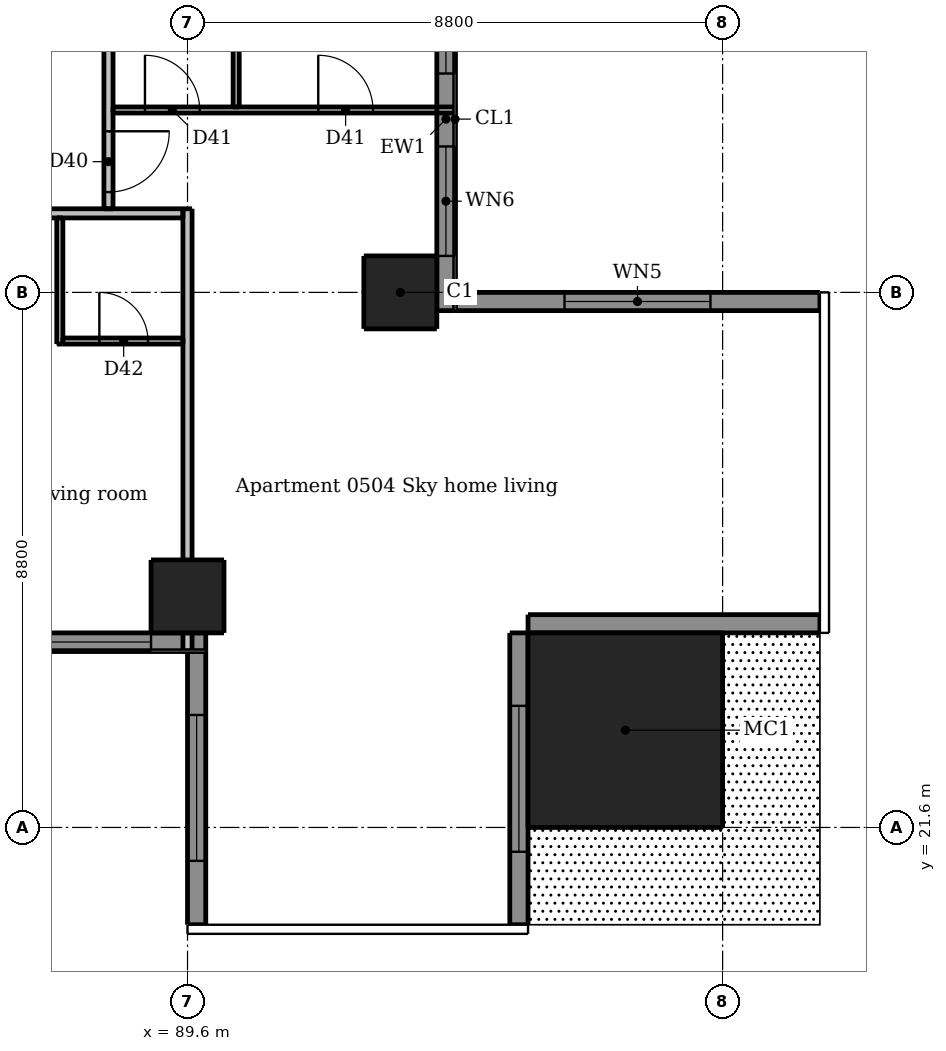
"""IFC4 building model, lengths in metres.
Left out: names, types, materials, properties, quantities, classifications, styles, units other than length and angle.
Written with IfcOpenShell. Run it as: python <this file> out.ifc"""

import sys

from ifc_helpers import new_model, si_unit, direction, frame, frame_2d, origin, origin_2d, place, context, subcontext, project, spatial, rectangle, extrude, element, fill, save


model = new_model("IFC4")
c1 = context("Model", 3, precision=1e-05, world=origin(), true_north=direction((0.0, 1.0)))
c2 = subcontext(c1, "Body", "Model", "MODEL_VIEW")
j1 = project(units=[si_unit("LENGTHUNIT", "METRE"), si_unit("PLANEANGLEUNIT", "RADIAN")], contexts=[c1])
p1 = place(None, origin())
s1 = spatial("IfcSite", under=j1, at=p1, CompositionType="ELEMENT")
p2 = place(p1, origin())
s2 = spatial("IfcBuilding", under=s1, at=p2, CompositionType="ELEMENT")
p3 = place(p2, frame((0.0, 0.0, 23.5)))
s3 = spatial("IfcBuildingStorey", under=s2, at=p3, CompositionType="ELEMENT", Elevation=23.5)
for number, where, z_axis, x_axis in (
    (1, (89.6, 25.4, 0.0), (0.0, 0.0, 1.0), (1.0, 0.0, 0.0)),
    (2, (93.1, 30.4, 0.0), (0.0, 0.0, 1.0), (1.0, 0.0, 0.0)),
):
    element("IfcColumn", number, at=place(p3, frame(where, z_axis=z_axis, x_axis=x_axis)), inside=s3, PredefinedType="COLUMN", context=c2, shape_type="SweptSolid", body=[
        extrude(rectangle(XDim=1.2, YDim=1.2, at=origin_2d()), origin(), (0.0, 0.0, 1.0), 3.05),
    ])
p4 = place(p3, frame((96.8, 23.2, 0.0), z_axis=(0.0, 0.0, 1.0), x_axis=(1.0, 0.0, 0.0)))
e3 = element("IfcColumn", 3, at=p4, inside=s3, PredefinedType="COLUMN", context=c2, shape_type="SweptSolid", body=[
    extrude(rectangle(XDim=3.2, YDim=3.2, at=origin_2d()), origin(), (0.0, 0.0, 1.0), 3.3),
])
p5 = place(p3, frame((89.75, 24.5, 0.0), z_axis=(0.0, 0.0, 1.0), x_axis=(0.0, -1.0, 0.0)))
e4 = element("IfcWall", 4, at=p5, inside=s3, PredefinedType="SOLIDWALL", context=c2, shape_type="SweptSolid", body=[
    extrude(rectangle(XDim=4.5, YDim=0.3, at=frame_2d((2.25, 0.0))), origin(), (0.0, 0.0, 1.0), 3.05),
])
p6 = place(p5, frame((1.05, 0.0, 0.15)))
e5 = element("IfcOpeningElement", 5, at=p6, cuts=e4, PredefinedType="OPENING", context=c2, shape_type="SweptSolid", body=[
    extrude(rectangle(XDim=2.4, YDim=2.1, at=frame_2d((1.2, 1.05))), frame((0.0, 0.16, 0.0), z_axis=(0.0, -1.0, 0.0), x_axis=(1.0, 0.0, 0.0)), (0.0, 0.0, 1.0), 0.32),
])
p7 = place(p3, frame((95.05, 20.0, 0.0), z_axis=(0.0, 0.0, 1.0), x_axis=(0.0, 1.0, 0.0)))
e6 = element("IfcWall", 6, at=p7, inside=s3, PredefinedType="SOLIDWALL", context=c2, shape_type="SweptSolid", body=[
    extrude(rectangle(XDim=4.8, YDim=0.3, at=frame_2d((2.4, 0.0))), origin(), (0.0, 0.0, 1.0), 3.05),
])
p8 = place(p7, frame((1.2, 0.0, 0.15)))
e7 = element("IfcOpeningElement", 7, at=p8, cuts=e6, PredefinedType="OPENING", context=c2, shape_type="SweptSolid", body=[
    extrude(rectangle(XDim=2.4, YDim=2.1, at=frame_2d((1.2, 1.05))), frame((0.0, 0.16, 0.0), z_axis=(0.0, -1.0, 0.0), x_axis=(1.0, 0.0, 0.0)), (0.0, 0.0, 1.0), 0.32),
])
p9 = place(p3, frame((95.2, 24.95, 0.0), z_axis=(0.0, 0.0, 1.0), x_axis=(1.0, 0.0, 0.0)))
e8 = element("IfcWall", 8, at=p9, inside=s3, PredefinedType="SOLIDWALL", context=c2, shape_type="SweptSolid", body=[
    extrude(rectangle(XDim=4.8, YDim=0.3, at=frame_2d((2.4, 0.0))), origin(), (0.0, 0.0, 1.0), 3.05),
])
p10 = place(p3, frame((100.0, 30.25, 0.0), z_axis=(0.0, 0.0, 1.0), x_axis=(-1.0, 0.0, 0.0)))
e9 = element("IfcWall", 9, at=p10, inside=s3, PredefinedType="SOLIDWALL", context=c2, shape_type="SweptSolid", body=[
    extrude(rectangle(XDim=6.0, YDim=0.3, at=frame_2d((3.0, 0.0))), origin(), (0.0, 0.0, 1.0), 3.05),
])
p11 = place(p10, frame((1.8, 0.0, 0.15)))
e10 = element("IfcOpeningElement", 10, at=p11, cuts=e9, PredefinedType="OPENING", context=c2, shape_type="SweptSolid", body=[
    extrude(rectangle(XDim=2.4, YDim=2.1, at=frame_2d((1.2, 1.05))), frame((0.0, 0.16, 0.0), z_axis=(0.0, -1.0, 0.0), x_axis=(1.0, 0.0, 0.0)), (0.0, 0.0, 1.0), 0.32),
])
p12 = place(p3, frame((83.9, 24.65, 0.0), z_axis=(0.0, 0.0, 1.0), x_axis=(1.0, 0.0, 0.0)))
e11 = element("IfcWall", 11, at=p12, inside=s3, PredefinedType="SOLIDWALL", context=c2, shape_type="SweptSolid", body=[
    extrude(rectangle(XDim=6.0, YDim=0.3, at=frame_2d((3.0, 0.0))), origin(), (0.0, 0.0, 1.0), 3.05),
])
p13 = place(p12, frame((0.3, 0.0, 0.15)))
e12 = element("IfcOpeningElement", 12, at=p13, cuts=e11, PredefinedType="OPENING", context=c2, shape_type="SweptSolid", body=[
    extrude(rectangle(XDim=1.8, YDim=2.1, at=frame_2d((0.9, 1.05))), frame((0.0, 0.16, 0.0), z_axis=(0.0, -1.0, 0.0), x_axis=(1.0, 0.0, 0.0)), (0.0, 0.0, 1.0), 0.32),
])
p14 = place(p12, frame((3.3, 0.0, 0.15)))
e13 = element("IfcOpeningElement", 13, at=p14, cuts=e11, PredefinedType="OPENING", context=c2, shape_type="SweptSolid", body=[
    extrude(rectangle(XDim=1.8, YDim=2.1, at=frame_2d((0.9, 1.05))), frame((0.0, 0.16, 0.0), z_axis=(0.0, -1.0, 0.0), x_axis=(1.0, 0.0, 0.0)), (0.0, 0.0, 1.0), 0.32),
])
p15 = place(p3, frame((93.85, 30.1, 0.0), z_axis=(0.0, 0.0, 1.0), x_axis=(0.0, 1.0, 0.0)))
e14 = element("IfcWall", 14, at=p15, inside=s3, PredefinedType="SOLIDWALL", context=c2, shape_type="SweptSolid", body=[
    extrude(rectangle(XDim=6.3, YDim=0.3, at=frame_2d((3.15, 0.0))), origin(), (0.0, 0.0, 1.0), 3.05),
])
p16 = place(p15, frame((0.9, 0.0, 0.15)))
e15 = element("IfcOpeningElement", 15, at=p16, cuts=e14, PredefinedType="OPENING", context=c2, shape_type="SweptSolid", body=[
    extrude(rectangle(XDim=1.8, YDim=2.1, at=frame_2d((0.9, 1.05))), frame((0.0, 0.16, 0.0), z_axis=(0.0, -1.0, 0.0), x_axis=(1.0, 0.0, 0.0)), (0.0, 0.0, 1.0), 0.32),
])
p17 = place(p15, frame((3.9, 0.0, 0.15)))
e16 = element("IfcOpeningElement", 16, at=p17, cuts=e14, PredefinedType="OPENING", context=c2, shape_type="SweptSolid", body=[
    extrude(rectangle(XDim=1.8, YDim=2.1, at=frame_2d((0.9, 1.05))), frame((0.0, 0.16, 0.0), z_axis=(0.0, -1.0, 0.0), x_axis=(1.0, 0.0, 0.0)), (0.0, 0.0, 1.0), 0.32),
])
p18 = place(p3, frame((87.5, 29.55, 0.0), z_axis=(0.0, 0.0, 1.0), x_axis=(0.0, 1.0, 0.0)))
e17 = element("IfcWall", 17, at=p18, inside=s3, PredefinedType="PARTITIONING", context=c2, shape_type="SweptSolid", body=[
    extrude(rectangle(XDim=2.075, YDim=0.1, at=frame_2d((1.038, 0.0))), origin(), (0.0, 0.0, 1.0), 3.05),
])
p19 = place(p3, frame((90.4, 33.45, 0.0), z_axis=(0.0, 0.0, 1.0), x_axis=(0.0, 1.0, 0.0)))
e18 = element("IfcWall", 18, at=p19, inside=s3, PredefinedType="PARTITIONING", context=c2, shape_type="SweptSolid", body=[
    extrude(rectangle(XDim=8.5, YDim=0.1, at=frame_2d((4.25, 0.0))), origin(), (0.0, 0.0, 1.0), 3.05),
])
p20 = place(p19, frame((3.8, 0.0, 0.0)))
e19 = element("IfcOpeningElement", 19, at=p20, cuts=e18, PredefinedType="OPENING", context=c2, shape_type="SweptSolid", body=[
    extrude(rectangle(XDim=0.8, YDim=2.1, at=frame_2d((0.4, 1.05))), frame((0.0, 0.06, 0.0), z_axis=(0.0, -1.0, 0.0), x_axis=(1.0, 0.0, 0.0)), (0.0, 0.0, 1.0), 0.12),
])
p21 = place(p19, frame((6.8, 0.0, 0.0)))
e20 = element("IfcOpeningElement", 20, at=p21, cuts=e18, PredefinedType="OPENING", context=c2, shape_type="SweptSolid", body=[
    extrude(rectangle(XDim=0.9, YDim=2.1, at=frame_2d((0.45, 1.05))), frame((0.0, 0.06, 0.0), z_axis=(0.0, -1.0, 0.0), x_axis=(1.0, 0.0, 0.0)), (0.0, 0.0, 1.0), 0.12),
])
p22 = place(p3, frame((88.375, 33.4, 0.0), z_axis=(0.0, 0.0, 1.0), x_axis=(1.0, 0.0, 0.0)))
e21 = element("IfcWall", 21, at=p22, inside=s3, PredefinedType="PARTITIONING", context=c2, shape_type="SweptSolid", body=[
    extrude(rectangle(XDim=5.625, YDim=0.1, at=frame_2d((2.812, 0.0))), origin(), (0.0, 0.0, 1.0), 3.05),
])
p23 = place(p22, frame((0.525, 0.0, 0.0)))
e22 = element("IfcOpeningElement", 22, at=p23, cuts=e21, PredefinedType="OPENING", context=c2, shape_type="SweptSolid", body=[
    extrude(rectangle(XDim=0.9, YDim=2.1, at=frame_2d((0.45, 1.05))), frame((0.0, 0.06, 0.0), z_axis=(0.0, -1.0, 0.0), x_axis=(1.0, 0.0, 0.0)), (0.0, 0.0, 1.0), 0.12),
])
p24 = place(p22, frame((3.375, 0.0, 0.0)))
e23 = element("IfcOpeningElement", 23, at=p24, cuts=e21, PredefinedType="OPENING", context=c2, shape_type="SweptSolid", body=[
    extrude(rectangle(XDim=0.9, YDim=2.1, at=frame_2d((0.45, 1.05))), frame((0.0, 0.06, 0.0), z_axis=(0.0, -1.0, 0.0), x_axis=(1.0, 0.0, 0.0)), (0.0, 0.0, 1.0), 0.12),
])
p25 = place(p3, frame((87.55, 29.6, 0.0), z_axis=(0.0, 0.0, 1.0), x_axis=(1.0, 0.0, 0.0)))
e24 = element("IfcWall", 24, at=p25, inside=s3, PredefinedType="PARTITIONING", context=c2, shape_type="SweptSolid", body=[
    extrude(rectangle(XDim=1.975, YDim=0.1, at=frame_2d((0.987, 0.0))), origin(), (0.0, 0.0, 1.0), 3.05),
])
p26 = place(p25, frame((0.6, 0.0, 0.0)))
e25 = element("IfcOpeningElement", 25, at=p26, cuts=e24, PredefinedType="OPENING", context=c2, shape_type="SweptSolid", body=[
    extrude(rectangle(XDim=0.8, YDim=2.1, at=frame_2d((0.4, 1.05))), frame((0.0, 0.06, 0.0), z_axis=(0.0, -1.0, 0.0), x_axis=(1.0, 0.0, 0.0)), (0.0, 0.0, 1.0), 0.12),
])
p27 = place(p3, frame((88.3, 60.475, 0.0), z_axis=(0.0, 0.0, 1.0), x_axis=(0.0, -1.0, 0.0)))
e26 = element("IfcWall", 26, at=p27, inside=s3, PredefinedType="PARTITIONING", context=c2, shape_type="SweptSolid", body=[
    extrude(rectangle(XDim=28.7, YDim=0.15, at=frame_2d((14.35, 0.0))), origin(), (0.0, 0.0, 1.0), 3.05),
])
p28 = place(p27, frame((27.425, 0.0, 0.0)))
e27 = element("IfcOpeningElement", 27, at=p28, cuts=e26, PredefinedType="OPENING", context=c2, shape_type="SweptSolid", body=[
    extrude(rectangle(XDim=1.0, YDim=2.1, at=frame_2d((0.5, 1.05))), frame((0.0, 0.085, 0.0), z_axis=(0.0, -1.0, 0.0), x_axis=(1.0, 0.0, 0.0)), (0.0, 0.0, 1.0), 0.17),
])
p29 = place(p27, frame((16.325, 0.0, 0.0)))
e28 = element("IfcOpeningElement", 28, at=p29, cuts=e26, PredefinedType="OPENING", context=c2, shape_type="SweptSolid", body=[
    extrude(rectangle(XDim=1.0, YDim=2.1, at=frame_2d((0.5, 1.05))), frame((0.0, 0.085, 0.0), z_axis=(0.0, -1.0, 0.0), x_axis=(1.0, 0.0, 0.0)), (0.0, 0.0, 1.0), 0.17),
])
p30 = place(p27, frame((5.525, 0.0, 0.0)))
e29 = element("IfcOpeningElement", 29, at=p30, cuts=e26, PredefinedType="OPENING", context=c2, shape_type="SweptSolid", body=[
    extrude(rectangle(XDim=1.0, YDim=2.1, at=frame_2d((0.5, 1.05))), frame((0.0, 0.085, 0.0), z_axis=(0.0, -1.0, 0.0), x_axis=(1.0, 0.0, 0.0)), (0.0, 0.0, 1.0), 0.17),
])
p31 = place(p3, frame((89.6, 24.5, 0.0), z_axis=(0.0, 0.0, 1.0), x_axis=(0.0, 1.0, 0.0)))
e30 = element("IfcWall", 30, at=p31, inside=s3, PredefinedType="PARTITIONING", context=c2, shape_type="SweptSolid", body=[
    extrude(rectangle(XDim=7.275, YDim=0.15, at=frame_2d((3.637, 0.0))), origin(), (0.0, 0.0, 1.0), 2.516),
])
p32 = place(p3, frame((89.525, 31.7, 0.0), z_axis=(0.0, 0.0, 1.0), x_axis=(-1.0, 0.0, 0.0)))
e31 = element("IfcWall", 31, at=p32, inside=s3, PredefinedType="PARTITIONING", context=c2, shape_type="SweptSolid", body=[
    extrude(rectangle(XDim=28.75, YDim=0.15, at=frame_2d((14.375, 0.0))), origin(), (0.0, 0.0, 1.0), 3.05),
])
p33 = place(p32, frame((24.625, 0.0, 0.0)))
e32 = element("IfcOpeningElement", 32, at=p33, cuts=e31, PredefinedType="OPENING", context=c2, shape_type="SweptSolid", body=[
    extrude(rectangle(XDim=1.0, YDim=2.1, at=frame_2d((0.5, 1.05))), frame((0.0, 0.085, 0.0), z_axis=(0.0, -1.0, 0.0), x_axis=(1.0, 0.0, 0.0)), (0.0, 0.0, 1.0), 0.17),
])
p34 = place(p32, frame((10.225, 0.0, 0.0)))
e33 = element("IfcOpeningElement", 33, at=p34, cuts=e31, PredefinedType="OPENING", context=c2, shape_type="SweptSolid", body=[
    extrude(rectangle(XDim=1.0, YDim=2.1, at=frame_2d((0.5, 1.05))), frame((0.0, 0.085, 0.0), z_axis=(0.0, -1.0, 0.0), x_axis=(1.0, 0.0, 0.0)), (0.0, 0.0, 1.0), 0.17),
])
p35 = place(p32, frame((2.425, 0.0, 0.0)))
e34 = element("IfcOpeningElement", 34, at=p35, cuts=e31, PredefinedType="OPENING", context=c2, shape_type="SweptSolid", body=[
    extrude(rectangle(XDim=1.0, YDim=2.1, at=frame_2d((0.5, 1.05))), frame((0.0, 0.085, 0.0), z_axis=(0.0, -1.0, 0.0), x_axis=(1.0, 0.0, 0.0)), (0.0, 0.0, 1.0), 0.17),
])
p36 = place(p6, origin())
e35 = element("IfcWindow", 35, at=p36, inside=s3, PartitioningType="DOUBLE_PANEL_VERTICAL", PredefinedType="WINDOW", context=c2, shape_type="SweptSolid", body=[
    extrude(rectangle(XDim=2.4, YDim=2.1, at=frame_2d((1.2, 1.05))), frame((0.0, 0.03, 0.0), z_axis=(0.0, -1.0, 0.0), x_axis=(1.0, 0.0, 0.0)), (0.0, 0.0, 1.0), 0.06),
])
fill(e5, e35)
p37 = place(p8, origin())
e36 = element("IfcWindow", 36, at=p37, inside=s3, PartitioningType="DOUBLE_PANEL_VERTICAL", PredefinedType="WINDOW", context=c2, shape_type="SweptSolid", body=[
    extrude(rectangle(XDim=2.4, YDim=2.1, at=frame_2d((1.2, 1.05))), frame((0.0, 0.03, 0.0), z_axis=(0.0, -1.0, 0.0), x_axis=(1.0, 0.0, 0.0)), (0.0, 0.0, 1.0), 0.06),
])
fill(e7, e36)
p38 = place(p11, origin())
e37 = element("IfcWindow", 37, at=p38, inside=s3, PartitioningType="DOUBLE_PANEL_VERTICAL", PredefinedType="WINDOW", context=c2, shape_type="SweptSolid", body=[
    extrude(rectangle(XDim=2.4, YDim=2.1, at=frame_2d((1.2, 1.05))), frame((0.0, 0.03, 0.0), z_axis=(0.0, -1.0, 0.0), x_axis=(1.0, 0.0, 0.0)), (0.0, 0.0, 1.0), 0.06),
])
fill(e10, e37)
p39 = place(p14, origin())
e38 = element("IfcWindow", 38, at=p39, inside=s3, PartitioningType="DOUBLE_PANEL_VERTICAL", PredefinedType="WINDOW", context=c2, shape_type="SweptSolid", body=[
    extrude(rectangle(XDim=1.8, YDim=2.1, at=frame_2d((0.9, 1.05))), frame((0.0, 0.03, 0.0), z_axis=(0.0, -1.0, 0.0), x_axis=(1.0, 0.0, 0.0)), (0.0, 0.0, 1.0), 0.06),
])
fill(e13, e38)
p40 = place(p16, origin())
e39 = element("IfcWindow", 39, at=p40, inside=s3, PartitioningType="DOUBLE_PANEL_VERTICAL", PredefinedType="WINDOW", context=c2, shape_type="SweptSolid", body=[
    extrude(rectangle(XDim=1.8, YDim=2.1, at=frame_2d((0.9, 1.05))), frame((0.0, 0.03, 0.0), z_axis=(0.0, -1.0, 0.0), x_axis=(1.0, 0.0, 0.0)), (0.0, 0.0, 1.0), 0.06),
])
fill(e15, e39)
p41 = place(p17, origin())
e40 = element("IfcWindow", 40, at=p41, inside=s3, PartitioningType="DOUBLE_PANEL_VERTICAL", PredefinedType="WINDOW", context=c2, shape_type="SweptSolid", body=[
    extrude(rectangle(XDim=1.8, YDim=2.1, at=frame_2d((0.9, 1.05))), frame((0.0, 0.03, 0.0), z_axis=(0.0, -1.0, 0.0), x_axis=(1.0, 0.0, 0.0)), (0.0, 0.0, 1.0), 0.06),
])
fill(e16, e40)
p42 = place(p26, origin())
e41 = element("IfcDoor", 41, at=p42, inside=s3, OperationType="SINGLE_SWING_LEFT", PredefinedType="DOOR", context=c2, shape_type="SweptSolid", body=[
    extrude(rectangle(XDim=0.8, YDim=2.1, at=frame_2d((0.4, 1.05))), frame((0.0, 0.025, 0.0), z_axis=(0.0, -1.0, 0.0), x_axis=(1.0, 0.0, 0.0)), (0.0, 0.0, 1.0), 0.05),
])
fill(e25, e41)
p43 = place(p28, origin())
e42 = element("IfcDoor", 42, at=p43, inside=s3, OperationType="SINGLE_SWING_LEFT", PredefinedType="DOOR", context=c2, shape_type="SweptSolid", body=[
    extrude(rectangle(XDim=1.0, YDim=2.1, at=frame_2d((0.5, 1.05))), frame((0.0, 0.025, 0.0), z_axis=(0.0, -1.0, 0.0), x_axis=(1.0, 0.0, 0.0)), (0.0, 0.0, 1.0), 0.05),
])
fill(e27, e42)
p44 = place(p23, origin())
e43 = element("IfcDoor", 43, at=p44, inside=s3, OperationType="SINGLE_SWING_LEFT", PredefinedType="DOOR", context=c2, shape_type="SweptSolid", body=[
    extrude(rectangle(XDim=0.9, YDim=2.1, at=frame_2d((0.45, 1.05))), frame((0.0, 0.025, 0.0), z_axis=(0.0, -1.0, 0.0), x_axis=(1.0, 0.0, 0.0)), (0.0, 0.0, 1.0), 0.05),
])
fill(e22, e43)
p45 = place(p24, origin())
e44 = element("IfcDoor", 44, at=p45, inside=s3, OperationType="SINGLE_SWING_LEFT", PredefinedType="DOOR", context=c2, shape_type="SweptSolid", body=[
    extrude(rectangle(XDim=0.9, YDim=2.1, at=frame_2d((0.45, 1.05))), frame((0.0, 0.025, 0.0), z_axis=(0.0, -1.0, 0.0), x_axis=(1.0, 0.0, 0.0)), (0.0, 0.0, 1.0), 0.05),
])
fill(e23, e44)
save(model, sys.argv[1])
